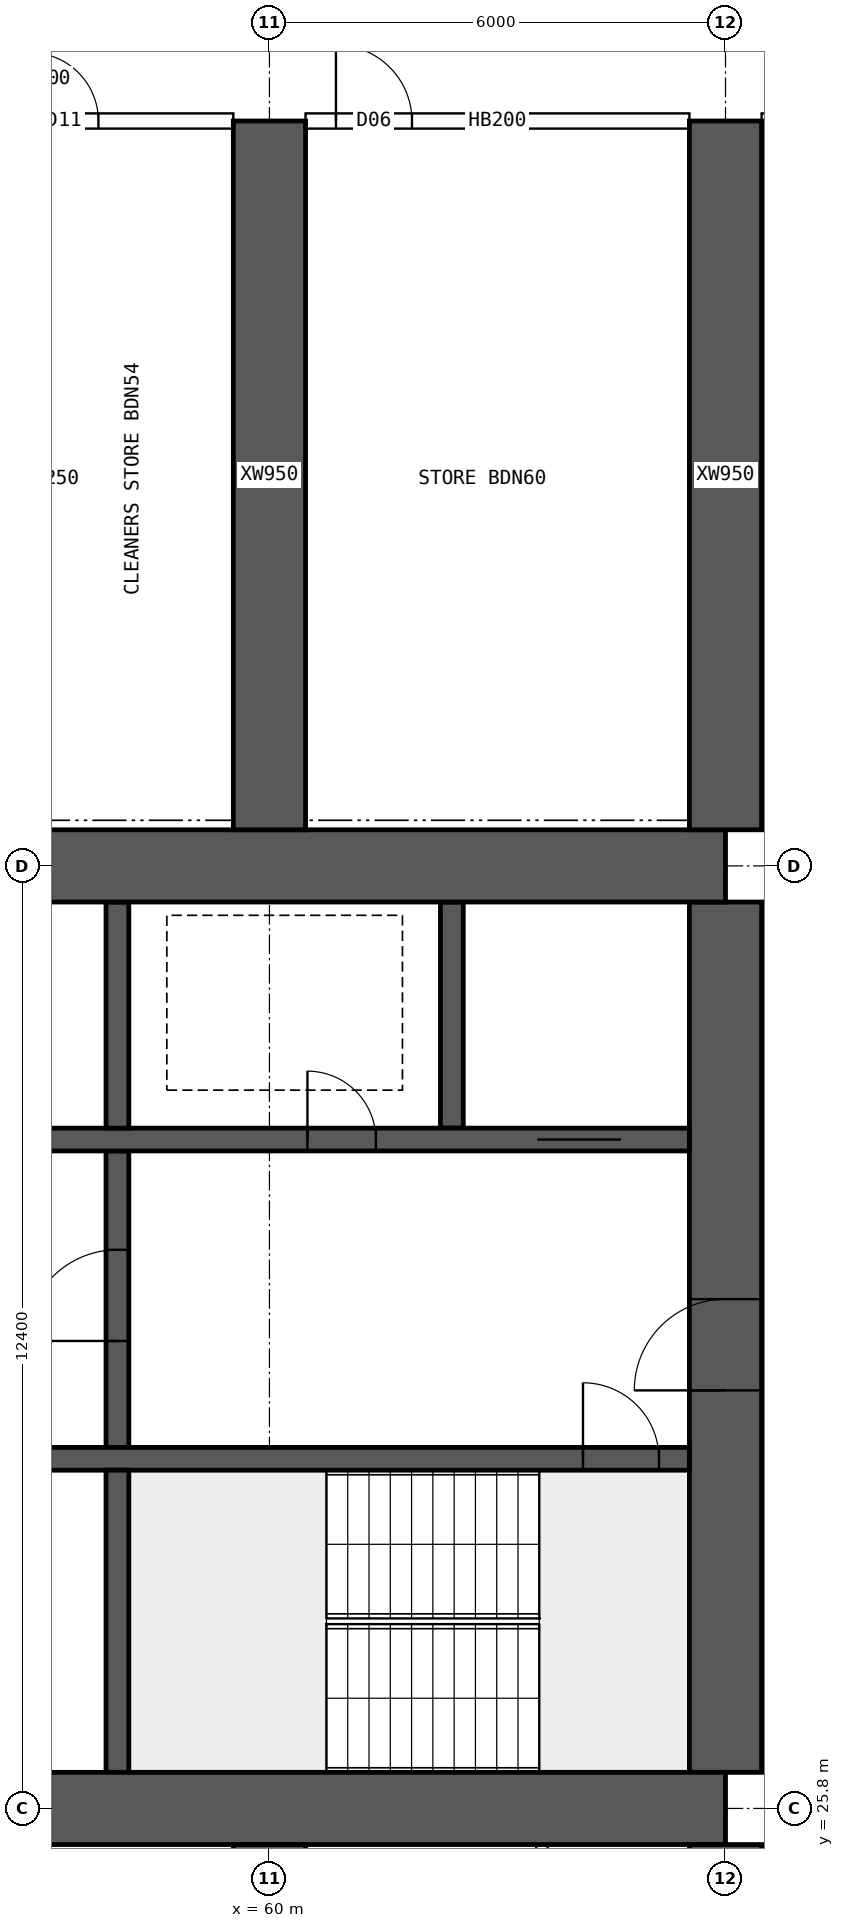
"""IFC4 building model, lengths in metres.
Left out: names, types, materials, properties, quantities, classifications, styles, units other than length and angle.
Written with IfcOpenShell. Run it as: python <this file> out.ifc"""

import sys

from ifc_helpers import new_model, si_unit, direction, frame, frame_2d, origin, place, context, subcontext, project, spatial, rectangle, extrude, element, fill, save


model = new_model("IFC4")
c1 = context("Model", 3, precision=1e-05, world=origin(), true_north=direction((0.0, 1.0)))
c2 = subcontext(c1, "Body", "Model", "MODEL_VIEW")
j1 = project(units=[si_unit("LENGTHUNIT", "METRE"), si_unit("PLANEANGLEUNIT", "RADIAN")], contexts=[c1])
p1 = place(None, origin())
s1 = spatial("IfcSite", under=j1, at=p1, CompositionType="ELEMENT")
p2 = place(p1, origin())
s2 = spatial("IfcBuilding", under=s1, at=p2, CompositionType="ELEMENT")
p3 = place(p2, frame((0.0, 0.0, 125.65)))
s3 = spatial("IfcBuildingStorey", under=s2, at=p3, CompositionType="ELEMENT", Elevation=125.65)
for number, where, z_axis, x_axis in (
    (1, (18.0, 25.8, 0.0), (0.0, 0.0, 1.0), (1.0, 0.0, 0.0)),
    (2, (18.0, 38.2, 0.0), (0.0, 0.0, 1.0), (1.0, 0.0, 0.0)),
):
    element("IfcWall", number, at=place(p3, frame(where, z_axis=z_axis, x_axis=x_axis)), inside=s3, PredefinedType="SHEAR", context=c2, shape_type="SweptSolid", body=[
        extrude(rectangle(XDim=48.0, YDim=0.95, at=frame_2d((24.0, 0.0))), origin(), (0.0, 0.0, 1.0), 3.75),
    ])
p4 = place(p3, frame((66.0, 26.275, 0.0), z_axis=(0.0, 0.0, 1.0), x_axis=(0.0, 1.0, 0.0)))
e3 = element("IfcWall", 3, at=p4, inside=s3, PredefinedType="SHEAR", context=c2, shape_type="SweptSolid", body=[
    extrude(rectangle(XDim=11.45, YDim=0.95, at=frame_2d((5.725, 0.0))), origin(), (0.0, 0.0, 1.0), 3.75),
])
p5 = place(p4, frame((5.025, 0.0, 0.0)))
e4 = element("IfcOpeningElement", 4, at=p5, cuts=e3, PredefinedType="OPENING", context=c2, shape_type="SweptSolid", body=[
    extrude(rectangle(XDim=1.2, YDim=2.1, at=frame_2d((0.6, 1.05))), frame((0.0, 0.485, 0.0), z_axis=(0.0, -1.0, 0.0), x_axis=(1.0, 0.0, 0.0)), (0.0, 0.0, 1.0), 0.97),
])
p6 = place(p3, frame((18.475, 30.4, 0.0), z_axis=(0.0, 0.0, 1.0), x_axis=(1.0, 0.0, 0.0)))
e5 = element("IfcWall", 5, at=p6, inside=s3, PredefinedType="SHEAR", context=c2, shape_type="SweptSolid", body=[
    extrude(rectangle(XDim=47.05, YDim=0.3, at=frame_2d((23.525, 0.0))), origin(), (0.0, 0.0, 1.0), 3.75),
])
p7 = place(p6, frame((0.4, 0.0, 0.0)))
e6 = element("IfcOpeningElement", 6, at=p7, cuts=e5, PredefinedType="OPENING", context=c2, shape_type="SweptSolid", body=[
    extrude(rectangle(XDim=1.0, YDim=2.1, at=frame_2d((0.5, 1.05))), frame((0.0, 0.16, 0.0), z_axis=(0.0, -1.0, 0.0), x_axis=(1.0, 0.0, 0.0)), (0.0, 0.0, 1.0), 0.32),
])
p8 = place(p6, frame((45.65, 0.0, 0.0)))
e7 = element("IfcOpeningElement", 7, at=p8, cuts=e5, PredefinedType="OPENING", context=c2, shape_type="SweptSolid", body=[
    extrude(rectangle(XDim=1.0, YDim=2.1, at=frame_2d((0.5, 1.05))), frame((0.0, 0.16, 0.0), z_axis=(0.0, -1.0, 0.0), x_axis=(1.0, 0.0, 0.0)), (0.0, 0.0, 1.0), 0.32),
])
p9 = place(p6, frame((8.275, 0.0, 0.0)))
e8 = element("IfcOpeningElement", 8, at=p9, cuts=e5, PredefinedType="OPENING", context=c2, shape_type="SweptSolid", body=[
    extrude(rectangle(XDim=1.1, YDim=2.1, at=frame_2d((0.55, 1.05))), frame((0.0, 0.16, 0.0), z_axis=(0.0, -1.0, 0.0), x_axis=(1.0, 0.0, 0.0)), (0.0, 0.0, 1.0), 0.32),
])
p10 = place(p6, frame((10.875, 0.0, 0.0)))
e9 = element("IfcOpeningElement", 9, at=p10, cuts=e5, PredefinedType="OPENING", context=c2, shape_type="SweptSolid", body=[
    extrude(rectangle(XDim=1.1, YDim=2.1, at=frame_2d((0.55, 1.05))), frame((0.0, 0.16, 0.0), z_axis=(0.0, -1.0, 0.0), x_axis=(1.0, 0.0, 0.0)), (0.0, 0.0, 1.0), 0.32),
])
p11 = place(p6, frame((13.475, 0.0, 0.0)))
e10 = element("IfcOpeningElement", 10, at=p11, cuts=e5, PredefinedType="OPENING", context=c2, shape_type="SweptSolid", body=[
    extrude(rectangle(XDim=1.1, YDim=2.1, at=frame_2d((0.55, 1.05))), frame((0.0, 0.16, 0.0), z_axis=(0.0, -1.0, 0.0), x_axis=(1.0, 0.0, 0.0)), (0.0, 0.0, 1.0), 0.32),
])
p12 = place(p6, frame((16.075, 0.0, 0.0)))
e11 = element("IfcOpeningElement", 11, at=p12, cuts=e5, PredefinedType="OPENING", context=c2, shape_type="SweptSolid", body=[
    extrude(rectangle(XDim=1.1, YDim=2.1, at=frame_2d((0.55, 1.05))), frame((0.0, 0.16, 0.0), z_axis=(0.0, -1.0, 0.0), x_axis=(1.0, 0.0, 0.0)), (0.0, 0.0, 1.0), 0.32),
])
p13 = place(p6, frame((18.85, 0.0, 0.0)))
e12 = element("IfcOpeningElement", 12, at=p13, cuts=e5, PredefinedType="OPENING", context=c2, shape_type="SweptSolid", body=[
    extrude(rectangle(XDim=0.9, YDim=2.1, at=frame_2d((0.45, 1.05))), frame((0.0, 0.16, 0.0), z_axis=(0.0, -1.0, 0.0), x_axis=(1.0, 0.0, 0.0)), (0.0, 0.0, 1.0), 0.32),
])
p14 = place(p6, frame((30.142, 0.0, 0.0)))
e13 = element("IfcOpeningElement", 13, at=p14, cuts=e5, PredefinedType="OPENING", context=c2, shape_type="SweptSolid", body=[
    extrude(rectangle(XDim=1.1, YDim=2.1, at=frame_2d((0.55, 1.05))), frame((0.0, 0.16, 0.0), z_axis=(0.0, -1.0, 0.0), x_axis=(1.0, 0.0, 0.0)), (0.0, 0.0, 1.0), 0.32),
])
p15 = place(p6, frame((33.675, 0.0, 0.0)))
e14 = element("IfcOpeningElement", 14, at=p15, cuts=e5, PredefinedType="OPENING", context=c2, shape_type="SweptSolid", body=[
    extrude(rectangle(XDim=1.1, YDim=2.1, at=frame_2d((0.55, 1.05))), frame((0.0, 0.16, 0.0), z_axis=(0.0, -1.0, 0.0), x_axis=(1.0, 0.0, 0.0)), (0.0, 0.0, 1.0), 0.32),
])
p16 = place(p6, frame((37.208, 0.0, 0.0)))
e15 = element("IfcOpeningElement", 15, at=p16, cuts=e5, PredefinedType="OPENING", context=c2, shape_type="SweptSolid", body=[
    extrude(rectangle(XDim=1.1, YDim=2.1, at=frame_2d((0.55, 1.05))), frame((0.0, 0.16, 0.0), z_axis=(0.0, -1.0, 0.0), x_axis=(1.0, 0.0, 0.0)), (0.0, 0.0, 1.0), 0.32),
])
p17 = place(p3, frame((18.475, 34.6, 0.0), z_axis=(0.0, 0.0, 1.0), x_axis=(1.0, 0.0, 0.0)))
e16 = element("IfcWall", 16, at=p17, inside=s3, PredefinedType="SHEAR", context=c2, shape_type="SweptSolid", body=[
    extrude(rectangle(XDim=47.05, YDim=0.3, at=frame_2d((23.525, 0.0))), origin(), (0.0, 0.0, 1.0), 3.75),
])
p18 = place(p17, frame((0.9, 0.0, 0.0)))
e17 = element("IfcOpeningElement", 17, at=p18, cuts=e16, PredefinedType="OPENING", context=c2, shape_type="SweptSolid", body=[
    extrude(rectangle(XDim=1.1, YDim=2.1, at=frame_2d((0.55, 1.05))), frame((0.0, 0.16, 0.0), z_axis=(0.0, -1.0, 0.0), x_axis=(1.0, 0.0, 0.0)), (0.0, 0.0, 1.0), 0.32),
])
p19 = place(p17, frame((45.05, 0.0, 0.0)))
e18 = element("IfcOpeningElement", 18, at=p19, cuts=e16, PredefinedType="OPENING", context=c2, shape_type="SweptSolid", body=[
    extrude(rectangle(XDim=1.1, YDim=2.1, at=frame_2d((0.55, 1.05))), frame((0.0, 0.16, 0.0), z_axis=(0.0, -1.0, 0.0), x_axis=(1.0, 0.0, 0.0)), (0.0, 0.0, 1.0), 0.32),
])
p20 = place(p17, frame((4.125, 0.0, 0.0)))
e19 = element("IfcOpeningElement", 19, at=p20, cuts=e16, PredefinedType="OPENING", context=c2, shape_type="SweptSolid", body=[
    extrude(rectangle(XDim=0.9, YDim=2.1, at=frame_2d((0.45, 1.05))), frame((0.0, 0.16, 0.0), z_axis=(0.0, -1.0, 0.0), x_axis=(1.0, 0.0, 0.0)), (0.0, 0.0, 1.0), 0.32),
])
p21 = place(p17, frame((42.025, 0.0, 0.0)))
e20 = element("IfcOpeningElement", 20, at=p21, cuts=e16, PredefinedType="OPENING", context=c2, shape_type="SweptSolid", body=[
    extrude(rectangle(XDim=0.9, YDim=2.1, at=frame_2d((0.45, 1.05))), frame((0.0, 0.16, 0.0), z_axis=(0.0, -1.0, 0.0), x_axis=(1.0, 0.0, 0.0)), (0.0, 0.0, 1.0), 0.32),
])
p22 = place(p17, frame((8.9, 0.0, 0.0)))
e21 = element("IfcOpeningElement", 21, at=p22, cuts=e16, PredefinedType="OPENING", context=c2, shape_type="SweptSolid", body=[
    extrude(rectangle(XDim=0.9, YDim=2.1, at=frame_2d((0.45, 1.05))), frame((0.0, 0.16, 0.0), z_axis=(0.0, -1.0, 0.0), x_axis=(1.0, 0.0, 0.0)), (0.0, 0.0, 1.0), 0.32),
])
p23 = place(p17, frame((12.874, 0.0, 0.0)))
e22 = element("IfcOpeningElement", 22, at=p23, cuts=e16, PredefinedType="OPENING", context=c2, shape_type="SweptSolid", body=[
    extrude(rectangle(XDim=0.9, YDim=2.1, at=frame_2d((0.45, 1.05))), frame((0.0, 0.16, 0.0), z_axis=(0.0, -1.0, 0.0), x_axis=(1.0, 0.0, 0.0)), (0.0, 0.0, 1.0), 0.32),
])
p24 = place(p17, frame((16.521, 0.0, 0.0)))
e23 = element("IfcOpeningElement", 23, at=p24, cuts=e16, PredefinedType="OPENING", context=c2, shape_type="SweptSolid", body=[
    extrude(rectangle(XDim=0.9, YDim=2.1, at=frame_2d((0.45, 1.05))), frame((0.0, 0.16, 0.0), z_axis=(0.0, -1.0, 0.0), x_axis=(1.0, 0.0, 0.0)), (0.0, 0.0, 1.0), 0.32),
])
p25 = place(p17, frame((20.28, 0.0, 0.0)))
e24 = element("IfcOpeningElement", 24, at=p25, cuts=e16, PredefinedType="OPENING", context=c2, shape_type="SweptSolid", body=[
    extrude(rectangle(XDim=0.9, YDim=2.1, at=frame_2d((0.45, 1.05))), frame((0.0, 0.16, 0.0), z_axis=(0.0, -1.0, 0.0), x_axis=(1.0, 0.0, 0.0)), (0.0, 0.0, 1.0), 0.32),
])
p26 = place(p17, frame((24.686, 0.0, 0.0)))
e25 = element("IfcOpeningElement", 25, at=p26, cuts=e16, PredefinedType="OPENING", context=c2, shape_type="SweptSolid", body=[
    extrude(rectangle(XDim=0.9, YDim=2.1, at=frame_2d((0.45, 1.05))), frame((0.0, 0.16, 0.0), z_axis=(0.0, -1.0, 0.0), x_axis=(1.0, 0.0, 0.0)), (0.0, 0.0, 1.0), 0.32),
])
p27 = place(p17, frame((27.483, 0.0, 0.0)))
e26 = element("IfcOpeningElement", 26, at=p27, cuts=e16, PredefinedType="OPENING", context=c2, shape_type="SweptSolid", body=[
    extrude(rectangle(XDim=0.9, YDim=2.1, at=frame_2d((0.45, 1.05))), frame((0.0, 0.16, 0.0), z_axis=(0.0, -1.0, 0.0), x_axis=(1.0, 0.0, 0.0)), (0.0, 0.0, 1.0), 0.32),
])
p28 = place(p17, frame((29.45, 0.0, 0.0)))
e27 = element("IfcOpeningElement", 27, at=p28, cuts=e16, PredefinedType="OPENING", context=c2, shape_type="SweptSolid", body=[
    extrude(rectangle(XDim=0.9, YDim=2.1, at=frame_2d((0.45, 1.05))), frame((0.0, 0.16, 0.0), z_axis=(0.0, -1.0, 0.0), x_axis=(1.0, 0.0, 0.0)), (0.0, 0.0, 1.0), 0.32),
])
p29 = place(p17, frame((31.882, 0.0, 0.0)))
e28 = element("IfcOpeningElement", 28, at=p29, cuts=e16, PredefinedType="OPENING", context=c2, shape_type="SweptSolid", body=[
    extrude(rectangle(XDim=0.9, YDim=2.1, at=frame_2d((0.45, 1.05))), frame((0.0, 0.16, 0.0), z_axis=(0.0, -1.0, 0.0), x_axis=(1.0, 0.0, 0.0)), (0.0, 0.0, 1.0), 0.32),
])
p30 = place(p17, frame((34.617, 0.0, 0.0)))
e29 = element("IfcOpeningElement", 29, at=p30, cuts=e16, PredefinedType="OPENING", context=c2, shape_type="SweptSolid", body=[
    extrude(rectangle(XDim=0.9, YDim=2.1, at=frame_2d((0.45, 1.05))), frame((0.0, 0.16, 0.0), z_axis=(0.0, -1.0, 0.0), x_axis=(1.0, 0.0, 0.0)), (0.0, 0.0, 1.0), 0.32),
])
p31 = place(p17, frame((37.656, 0.0, 0.0)))
e30 = element("IfcOpeningElement", 30, at=p31, cuts=e16, PredefinedType="OPENING", context=c2, shape_type="SweptSolid", body=[
    extrude(rectangle(XDim=0.9, YDim=2.1, at=frame_2d((0.45, 1.05))), frame((0.0, 0.16, 0.0), z_axis=(0.0, -1.0, 0.0), x_axis=(1.0, 0.0, 0.0)), (0.0, 0.0, 1.0), 0.32),
])
p32 = place(p3, frame((58.0, 26.275, 0.0), z_axis=(0.0, 0.0, 1.0), x_axis=(0.0, 1.0, 0.0)))
e31 = element("IfcWall", 31, at=p32, inside=s3, PredefinedType="SHEAR", context=c2, shape_type="SweptSolid", body=[
    extrude(rectangle(XDim=3.975, YDim=0.3, at=frame_2d((1.988, 0.0))), origin(), (0.0, 0.0, 1.0), 3.75),
])
p33 = place(p3, frame((58.0, 30.55, 0.0), z_axis=(0.0, 0.0, 1.0), x_axis=(0.0, 1.0, 0.0)))
e32 = element("IfcWall", 32, at=p33, inside=s3, PredefinedType="SHEAR", context=c2, shape_type="SweptSolid", body=[
    extrude(rectangle(XDim=3.9, YDim=0.3, at=frame_2d((1.95, 0.0))), origin(), (0.0, 0.0, 1.0), 3.75),
])
p34 = place(p33, frame((1.4, 0.0, 0.0)))
e33 = element("IfcOpeningElement", 33, at=p34, cuts=e32, PredefinedType="OPENING", context=c2, shape_type="SweptSolid", body=[
    extrude(rectangle(XDim=1.2, YDim=2.1, at=frame_2d((0.6, 1.05))), frame((0.0, 0.16, 0.0), z_axis=(0.0, -1.0, 0.0), x_axis=(1.0, 0.0, 0.0)), (0.0, 0.0, 1.0), 0.32),
])
for number, where, z_axis, x_axis in (
    (34, (62.4, 34.75, 0.0), (0.0, 0.0, 1.0), (0.0, 1.0, 0.0)),
    (35, (58.0, 34.75, 0.0), (0.0, 0.0, 1.0), (0.0, 1.0, 0.0)),
):
    element("IfcWall", number, at=place(p3, frame(where, z_axis=z_axis, x_axis=x_axis)), inside=s3, PredefinedType="SHEAR", context=c2, shape_type="SweptSolid", body=[
        extrude(rectangle(XDim=2.975, YDim=0.3, at=frame_2d((1.488, 0.0))), origin(), (0.0, 0.0, 1.0), 3.75),
    ])
for number, where, z_axis, x_axis in (
    (36, (60.0, 16.0, 0.0), (0.0, 0.0, 1.0), (0.0, 1.0, 0.0)),
    (37, (60.0, 38.675, 0.0), (0.0, 0.0, 1.0), (0.0, 1.0, 0.0)),
    (38, (66.0, 16.0, 0.0), (0.0, 0.0, 1.0), (0.0, 1.0, 0.0)),
    (39, (66.0, 38.675, 0.0), (0.0, 0.0, 1.0), (0.0, 1.0, 0.0)),
):
    element("IfcWall", number, at=place(p3, frame(where, z_axis=z_axis, x_axis=x_axis)), inside=s3, PredefinedType="SHEAR", context=c2, shape_type="SweptSolid", body=[
        extrude(rectangle(XDim=9.325, YDim=0.95, at=frame_2d((4.663, 0.0))), origin(), (0.0, 0.0, 1.0), 3.75),
    ])
p35 = place(p3, frame((54.475, 48.0, 0.0), z_axis=(0.0, 0.0, 1.0), x_axis=(1.0, 0.0, 0.0)))
e40 = element("IfcWall", 40, at=p35, inside=s3, PredefinedType="SOLIDWALL", context=c2, shape_type="SweptSolid", body=[
    extrude(rectangle(XDim=5.05, YDim=0.2, at=frame_2d((2.525, 0.0))), origin(), (0.0, 0.0, 1.0), 3.5),
])
p36 = place(p35, frame((0.35, 0.0, 0.0)))
e41 = element("IfcOpeningElement", 41, at=p36, cuts=e40, PredefinedType="OPENING", context=c2, shape_type="SweptSolid", body=[
    extrude(rectangle(XDim=0.9, YDim=2.1, at=frame_2d((0.45, 1.05))), frame((0.0, 0.11, 0.0), z_axis=(0.0, -1.0, 0.0), x_axis=(1.0, 0.0, 0.0)), (0.0, 0.0, 1.0), 0.22),
])
p37 = place(p35, frame((2.375, 0.0, 0.0)))
e42 = element("IfcOpeningElement", 42, at=p37, cuts=e40, PredefinedType="OPENING", context=c2, shape_type="SweptSolid", body=[
    extrude(rectangle(XDim=0.9, YDim=2.1, at=frame_2d((0.45, 1.05))), frame((0.0, 0.11, 0.0), z_axis=(0.0, -1.0, 0.0), x_axis=(1.0, 0.0, 0.0)), (0.0, 0.0, 1.0), 0.22),
])
p38 = place(p3, frame((60.475, 48.0, 0.0), z_axis=(0.0, 0.0, 1.0), x_axis=(1.0, 0.0, 0.0)))
e43 = element("IfcWall", 43, at=p38, inside=s3, PredefinedType="SOLIDWALL", context=c2, shape_type="SweptSolid", body=[
    extrude(rectangle(XDim=5.05, YDim=0.2, at=frame_2d((2.525, 0.0))), origin(), (0.0, 0.0, 1.0), 3.5),
])
p39 = place(p38, frame((0.4, 0.0, 0.0)))
e44 = element("IfcOpeningElement", 44, at=p39, cuts=e43, PredefinedType="OPENING", context=c2, shape_type="SweptSolid", body=[
    extrude(rectangle(XDim=1.0, YDim=2.1, at=frame_2d((0.5, 1.05))), frame((0.0, 0.11, 0.0), z_axis=(0.0, -1.0, 0.0), x_axis=(1.0, 0.0, 0.0)), (0.0, 0.0, 1.0), 0.22),
])
p40 = place(p3, frame((66.475, 48.0, 0.0), z_axis=(0.0, 0.0, 1.0), x_axis=(1.0, 0.0, 0.0)))
e45 = element("IfcWall", 45, at=p40, inside=s3, PredefinedType="SOLIDWALL", context=c2, shape_type="SweptSolid", body=[
    extrude(rectangle(XDim=1.925, YDim=0.2, at=frame_2d((0.962, 0.0))), origin(), (0.0, 0.0, 1.0), 3.5),
])
p41 = place(p40, frame((0.05, 0.0, 0.0)))
e46 = element("IfcOpeningElement", 46, at=p41, cuts=e45, PredefinedType="OPENING", context=c2, shape_type="SweptSolid", body=[
    extrude(rectangle(XDim=1.2, YDim=2.1, at=frame_2d((0.6, 1.05))), frame((0.0, 0.11, 0.0), z_axis=(0.0, -1.0, 0.0), x_axis=(1.0, 0.0, 0.0)), (0.0, 0.0, 1.0), 0.22),
])
p42 = place(p3, frame((63.585, 16.1, 0.0), z_axis=(0.0, 0.0, 1.0), x_axis=(0.0, 1.0, 0.0)))
e47 = element("IfcWall", 47, at=p42, inside=s3, PredefinedType="PARTITIONING", context=c2, shape_type="SweptSolid", body=[
    extrude(rectangle(XDim=9.225, YDim=0.15, at=frame_2d((4.612, 0.0))), origin(), (0.0, 0.0, 1.0), 3.5),
])
p43 = place(p5, origin())
e48 = element("IfcDoor", 48, at=p43, inside=s3, OperationType="SINGLE_SWING_LEFT", PredefinedType="DOOR", context=c2, shape_type="SweptSolid", body=[
    extrude(rectangle(XDim=1.2, YDim=2.1, at=frame_2d((0.6, 1.05))), frame((0.0, 0.025, 0.0), z_axis=(0.0, -1.0, 0.0), x_axis=(1.0, 0.0, 0.0)), (0.0, 0.0, 1.0), 0.05),
])
fill(e4, e48)
p44 = place(p8, origin())
e49 = element("IfcDoor", 49, at=p44, inside=s3, OperationType="SINGLE_SWING_LEFT", PredefinedType="DOOR", context=c2, shape_type="SweptSolid", body=[
    extrude(rectangle(XDim=1.0, YDim=2.1, at=frame_2d((0.5, 1.05))), frame((0.0, 0.025, 0.0), z_axis=(0.0, -1.0, 0.0), x_axis=(1.0, 0.0, 0.0)), (0.0, 0.0, 1.0), 0.05),
])
fill(e7, e49)
p45 = place(p19, origin())
e50 = element("IfcDoor", 50, at=p45, inside=s3, OperationType="DOUBLE_DOOR_SLIDING", PredefinedType="DOOR", context=c2, shape_type="SweptSolid", body=[
    extrude(rectangle(XDim=1.1, YDim=2.1, at=frame_2d((0.55, 1.05))), frame((0.0, 0.025, 0.0), z_axis=(0.0, -1.0, 0.0), x_axis=(1.0, 0.0, 0.0)), (0.0, 0.0, 1.0), 0.05),
])
fill(e18, e50)
p46 = place(p21, origin())
e51 = element("IfcDoor", 51, at=p46, inside=s3, OperationType="SINGLE_SWING_LEFT", PredefinedType="DOOR", context=c2, shape_type="SweptSolid", body=[
    extrude(rectangle(XDim=0.9, YDim=2.1, at=frame_2d((0.45, 1.05))), frame((0.0, 0.025, 0.0), z_axis=(0.0, -1.0, 0.0), x_axis=(1.0, 0.0, 0.0)), (0.0, 0.0, 1.0), 0.05),
])
fill(e20, e51)
p47 = place(p34, origin())
e52 = element("IfcDoor", 52, at=p47, inside=s3, OperationType="SINGLE_SWING_LEFT", PredefinedType="DOOR", context=c2, shape_type="SweptSolid", body=[
    extrude(rectangle(XDim=1.2, YDim=2.1, at=frame_2d((0.6, 1.05))), frame((0.0, 0.025, 0.0), z_axis=(0.0, -1.0, 0.0), x_axis=(1.0, 0.0, 0.0)), (0.0, 0.0, 1.0), 0.05),
])
fill(e33, e52)
p48 = place(p37, origin())
e53 = element("IfcDoor", 53, at=p48, inside=s3, OperationType="SINGLE_SWING_LEFT", PredefinedType="DOOR", context=c2, shape_type="SweptSolid", body=[
    extrude(rectangle(XDim=0.9, YDim=2.1, at=frame_2d((0.45, 1.05))), frame((0.0, 0.025, 0.0), z_axis=(0.0, -1.0, 0.0), x_axis=(1.0, 0.0, 0.0)), (0.0, 0.0, 1.0), 0.05),
])
fill(e42, e53)
p49 = place(p39, origin())
e54 = element("IfcDoor", 54, at=p49, inside=s3, OperationType="SINGLE_SWING_LEFT", PredefinedType="DOOR", context=c2, shape_type="SweptSolid", body=[
    extrude(rectangle(XDim=1.0, YDim=2.1, at=frame_2d((0.5, 1.05))), frame((0.0, 0.025, 0.0), z_axis=(0.0, -1.0, 0.0), x_axis=(1.0, 0.0, 0.0)), (0.0, 0.0, 1.0), 0.05),
])
fill(e44, e54)
save(model, sys.argv[1])
